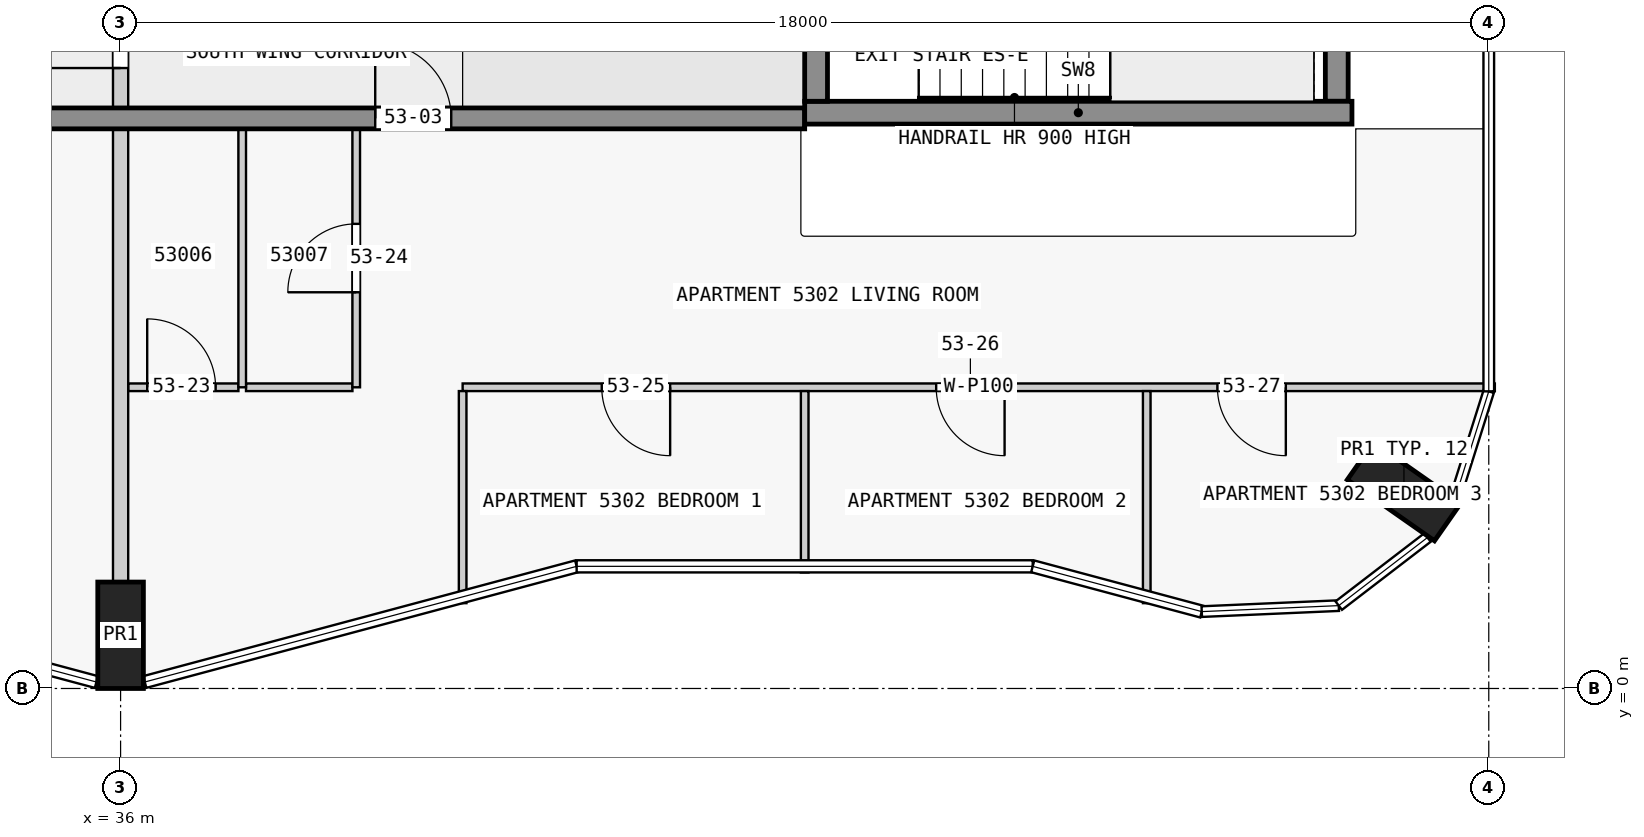
"""IFC4 building model, lengths in metres.
Left out: names, types, materials, properties, quantities, classifications, styles, units other than length and angle.
Written with IfcOpenShell. Run it as: python <this file> out.ifc"""

import sys

from ifc_helpers import new_model, si_unit, direction, frame, frame_2d, origin, origin_2d, place, context, subcontext, project, spatial, rectangle, extrude, element, fill, save


model = new_model("IFC4")
c1 = context("Model", 3, precision=1e-05, world=origin(), true_north=direction((0.0, 1.0)))
c2 = subcontext(c1, "Body", "Model", "MODEL_VIEW")
j1 = project(units=[si_unit("LENGTHUNIT", "METRE"), si_unit("PLANEANGLEUNIT", "RADIAN")], contexts=[c1])
p1 = place(None, origin())
s1 = spatial("IfcSite", under=j1, at=p1, CompositionType="ELEMENT")
p2 = place(p1, origin())
s2 = spatial("IfcBuilding", under=s1, at=p2, CompositionType="ELEMENT")
p3 = place(p2, frame((0.0, 0.0, 204.9)))
s3 = spatial("IfcBuildingStorey", under=s2, at=p3, CompositionType="ELEMENT", Elevation=204.9)
for number, where, z_axis, x_axis in (
    (1, (36.0, 0.7, 0.0), (0.0, 0.0, 1.0), (1.0, 0.0, 0.0)),
    (2, (52.884, 2.59, 0.0), (0.0, 0.0, 1.0), (0.574, 0.819, 0.0)),
):
    element("IfcColumn", number, at=place(p3, frame(where, z_axis=z_axis, x_axis=x_axis)), inside=s3, PredefinedType="COLUMN", context=c2, shape_type="SweptSolid", body=[
        extrude(rectangle(XDim=0.6, YDim=1.4, at=origin_2d()), origin(), (0.0, 0.0, 1.0), 3.5),
    ])
p4 = place(p3, frame((45.15, 7.725, 0.0), z_axis=(0.0, 0.0, 1.0), x_axis=(0.0, 1.0, 0.0)))
e3 = element("IfcWall", 3, at=p4, inside=s3, PredefinedType="SHEAR", context=c2, shape_type="SweptSolid", body=[
    extrude(rectangle(XDim=2.55, YDim=0.3, at=frame_2d((1.275, 0.0))), origin(), (0.0, 0.0, 1.0), 3.5),
])
p5 = place(p4, frame((0.725, 0.0, 0.0)))
e4 = element("IfcOpeningElement", 4, at=p5, cuts=e3, PredefinedType="OPENING", context=c2, shape_type="SweptSolid", body=[
    extrude(rectangle(XDim=1.1, YDim=2.1, at=frame_2d((0.55, 1.05))), frame((0.0, 0.16, 0.0), z_axis=(0.0, -1.0, 0.0), x_axis=(1.0, 0.0, 0.0)), (0.0, 0.0, 1.0), 0.32),
])
p6 = place(p3, frame((52.0, 7.725, 0.0), z_axis=(0.0, 0.0, 1.0), x_axis=(0.0, 1.0, 0.0)))
e5 = element("IfcWall", 5, at=p6, inside=s3, PredefinedType="SHEAR", context=c2, shape_type="SweptSolid", body=[
    extrude(rectangle(XDim=2.55, YDim=0.3, at=frame_2d((1.275, 0.0))), origin(), (0.0, 0.0, 1.0), 3.5),
])
p7 = place(p3, frame((45.0, 7.575, 0.0), z_axis=(0.0, 0.0, 1.0), x_axis=(1.0, 0.0, 0.0)))
e6 = element("IfcWall", 6, at=p7, inside=s3, PredefinedType="SHEAR", context=c2, shape_type="SweptSolid", body=[
    extrude(rectangle(XDim=7.2, YDim=0.3, at=frame_2d((3.6, 0.0))), origin(), (0.0, 0.0, 1.0), 3.5),
])
p8 = place(p3, frame((22.5, 7.5, 0.0), z_axis=(0.0, 0.0, 1.0), x_axis=(1.0, 0.0, 0.0)))
e7 = element("IfcWall", 7, at=p8, inside=s3, PredefinedType="SHEAR", context=c2, shape_type="SweptSolid", body=[
    extrude(rectangle(XDim=22.5, YDim=0.275, at=frame_2d((11.25, 0.0))), origin(), (0.0, 0.0, 1.0), 3.25),
])
p9 = place(p8, frame((4.05, 0.0, 0.0)))
e8 = element("IfcOpeningElement", 8, at=p9, cuts=e7, PredefinedType="OPENING", context=c2, shape_type="SweptSolid", body=[
    extrude(rectangle(XDim=1.0, YDim=2.1, at=frame_2d((0.5, 1.05))), frame((0.0, 0.147, 0.0), z_axis=(0.0, -1.0, 0.0), x_axis=(1.0, 0.0, 0.0)), (0.0, 0.0, 1.0), 0.295),
])
p10 = place(p8, frame((10.35, 0.0, 0.0)))
e9 = element("IfcOpeningElement", 9, at=p10, cuts=e7, PredefinedType="OPENING", context=c2, shape_type="SweptSolid", body=[
    extrude(rectangle(XDim=1.8, YDim=2.1, at=frame_2d((0.9, 1.05))), frame((0.0, 0.147, 0.0), z_axis=(0.0, -1.0, 0.0), x_axis=(1.0, 0.0, 0.0)), (0.0, 0.0, 1.0), 0.295),
])
p11 = place(p8, frame((16.85, 0.0, 0.0)))
e10 = element("IfcOpeningElement", 10, at=p11, cuts=e7, PredefinedType="OPENING", context=c2, shape_type="SweptSolid", body=[
    extrude(rectangle(XDim=1.0, YDim=2.1, at=frame_2d((0.5, 1.05))), frame((0.0, 0.147, 0.0), z_axis=(0.0, -1.0, 0.0), x_axis=(1.0, 0.0, 0.0)), (0.0, 0.0, 1.0), 0.295),
])
p12 = place(p3, frame((54.08, 3.962, 0.0), z_axis=(0.0, 0.0, 1.0), x_axis=(-1.0, 0.0, 0.0)))
e11 = element("IfcWall", 11, at=p12, inside=s3, PredefinedType="PARTITIONING", context=c2, shape_type="SweptSolid", body=[
    extrude(rectangle(XDim=13.58, YDim=0.1, at=frame_2d((6.79, 0.0))), origin(), (0.0, 0.0, 1.0), 3.25),
])
p13 = place(p12, frame((10.85, 0.0, 0.0)))
e12 = element("IfcOpeningElement", 12, at=p13, cuts=e11, PredefinedType="OPENING", context=c2, shape_type="SweptSolid", body=[
    extrude(rectangle(XDim=0.9, YDim=2.1, at=frame_2d((0.45, 1.05))), frame((0.0, 0.06, 0.0), z_axis=(0.0, -1.0, 0.0), x_axis=(1.0, 0.0, 0.0)), (0.0, 0.0, 1.0), 0.12),
])
p14 = place(p12, frame((6.45, 0.0, 0.0)))
e13 = element("IfcOpeningElement", 13, at=p14, cuts=e11, PredefinedType="OPENING", context=c2, shape_type="SweptSolid", body=[
    extrude(rectangle(XDim=0.9, YDim=2.1, at=frame_2d((0.45, 1.05))), frame((0.0, 0.06, 0.0), z_axis=(0.0, -1.0, 0.0), x_axis=(1.0, 0.0, 0.0)), (0.0, 0.0, 1.0), 0.12),
])
p15 = place(p12, frame((2.75, 0.0, 0.0)))
e14 = element("IfcOpeningElement", 14, at=p15, cuts=e11, PredefinedType="OPENING", context=c2, shape_type="SweptSolid", body=[
    extrude(rectangle(XDim=0.9, YDim=2.1, at=frame_2d((0.45, 1.05))), frame((0.0, 0.06, 0.0), z_axis=(0.0, -1.0, 0.0), x_axis=(1.0, 0.0, 0.0)), (0.0, 0.0, 1.0), 0.12),
])
p16 = place(p3, frame((36.1, 3.962, 0.0), z_axis=(0.0, 0.0, 1.0), x_axis=(1.0, 0.0, 0.0)))
e15 = element("IfcWall", 15, at=p16, inside=s3, PredefinedType="PARTITIONING", context=c2, shape_type="SweptSolid", body=[
    extrude(rectangle(XDim=1.45, YDim=0.1, at=frame_2d((0.725, 0.0))), origin(), (0.0, 0.0, 1.0), 3.25),
])
p17 = place(p16, frame((0.25, 0.0, 0.0)))
e16 = element("IfcOpeningElement", 16, at=p17, cuts=e15, PredefinedType="OPENING", context=c2, shape_type="SweptSolid", body=[
    extrude(rectangle(XDim=0.9, YDim=2.1, at=frame_2d((0.45, 1.05))), frame((0.0, 0.06, 0.0), z_axis=(0.0, -1.0, 0.0), x_axis=(1.0, 0.0, 0.0)), (0.0, 0.0, 1.0), 0.12),
])
p18 = place(p3, frame((37.65, 3.962, 0.0), z_axis=(0.0, 0.0, 1.0), x_axis=(1.0, 0.0, 0.0)))
e17 = element("IfcWall", 17, at=p18, inside=s3, PredefinedType="PARTITIONING", context=c2, shape_type="SweptSolid", body=[
    extrude(rectangle(XDim=1.4, YDim=0.1, at=frame_2d((0.7, 0.0))), origin(), (0.0, 0.0, 1.0), 3.25),
])
p19 = place(p3, frame((36.0, 1.4, 0.0), z_axis=(0.0, 0.0, 1.0), x_axis=(0.0, 1.0, 0.0)))
e18 = element("IfcWall", 18, at=p19, inside=s3, PredefinedType="PARTITIONING", context=c2, shape_type="SweptSolid", body=[
    extrude(rectangle(XDim=5.963, YDim=0.2, at=frame_2d((2.981, 0.0))), origin(), (0.0, 0.0, 1.0), 3.25),
])
p20 = place(p3, frame((37.6, 3.962, 0.0), z_axis=(0.0, 0.0, 1.0), x_axis=(0.0, 1.0, 0.0)))
e19 = element("IfcWall", 19, at=p20, inside=s3, PredefinedType="PARTITIONING", context=c2, shape_type="SweptSolid", body=[
    extrude(rectangle(XDim=3.4, YDim=0.1, at=frame_2d((1.7, 0.0))), origin(), (0.0, 0.0, 1.0), 3.25),
])
p21 = place(p3, frame((39.1, 3.962, 0.0), z_axis=(0.0, 0.0, 1.0), x_axis=(0.0, 1.0, 0.0)))
e20 = element("IfcWall", 20, at=p21, inside=s3, PredefinedType="PARTITIONING", context=c2, shape_type="SweptSolid", body=[
    extrude(rectangle(XDim=3.4, YDim=0.1, at=frame_2d((1.7, 0.0))), origin(), (0.0, 0.0, 1.0), 3.25),
])
p22 = place(p21, frame((1.25, 0.0, 0.0)))
e21 = element("IfcOpeningElement", 21, at=p22, cuts=e20, PredefinedType="OPENING", context=c2, shape_type="SweptSolid", body=[
    extrude(rectangle(XDim=0.9, YDim=2.1, at=frame_2d((0.45, 1.05))), frame((0.0, 0.06, 0.0), z_axis=(0.0, -1.0, 0.0), x_axis=(1.0, 0.0, 0.0)), (0.0, 0.0, 1.0), 0.12),
])
p23 = place(p3, frame((40.5, 3.913, 0.0), z_axis=(0.0, 0.0, 1.0), x_axis=(0.0, -1.0, 0.0)))
e22 = element("IfcWall", 22, at=p23, inside=s3, PredefinedType="PARTITIONING", context=c2, shape_type="SweptSolid", body=[
    extrude(rectangle(XDim=2.79, YDim=0.1, at=frame_2d((1.395, 0.0))), origin(), (0.0, 0.0, 1.0), 3.25),
])
p24 = place(p3, frame((45.0, 1.527, 0.0), z_axis=(0.0, 0.0, 1.0), x_axis=(0.0, 1.0, 0.0)))
e23 = element("IfcWall", 23, at=p24, inside=s3, PredefinedType="PARTITIONING", context=c2, shape_type="SweptSolid", body=[
    extrude(rectangle(XDim=2.386, YDim=0.1, at=frame_2d((1.193, 0.0))), origin(), (0.0, 0.0, 1.0), 3.25),
])
p25 = place(p3, frame((49.5, 1.122, 0.0), z_axis=(0.0, 0.0, 1.0), x_axis=(0.0, 1.0, 0.0)))
e24 = element("IfcWall", 24, at=p25, inside=s3, PredefinedType="PARTITIONING", context=c2, shape_type="SweptSolid", body=[
    extrude(rectangle(XDim=2.79, YDim=0.1, at=frame_2d((1.395, 0.0))), origin(), (0.0, 0.0, 1.0), 3.25),
])
p26 = place(p3, frame((36.0, 7.462, 0.0), z_axis=(0.0, 0.0, 1.0), x_axis=(0.0, 1.0, 0.0)))
e25 = element("IfcWall", 25, at=p26, inside=s3, PredefinedType="PARTITIONING", context=c2, shape_type="SweptSolid", body=[
    extrude(rectangle(XDim=3.175, YDim=0.2, at=frame_2d((1.587, 0.0))), origin(), (0.0, 0.0, 1.0), 3.25),
])
p27 = place(p26, frame((0.7, 0.0, 0.0)))
e26 = element("IfcOpeningElement", 26, at=p27, cuts=e25, PredefinedType="OPENING", context=c2, shape_type="SweptSolid", body=[
    extrude(rectangle(XDim=1.8, YDim=2.1, at=frame_2d((0.9, 1.05))), frame((0.0, 0.11, 0.0), z_axis=(0.0, -1.0, 0.0), x_axis=(1.0, 0.0, 0.0)), (0.0, 0.0, 1.0), 0.22),
])
p28 = place(p11, origin())
e27 = element("IfcDoor", 27, at=p28, inside=s3, OperationType="SINGLE_SWING_RIGHT", PredefinedType="DOOR", context=c2, shape_type="SweptSolid", body=[
    extrude(rectangle(XDim=1.0, YDim=2.1, at=frame_2d((0.5, 1.05))), frame((0.0, 0.025, 0.0), z_axis=(0.0, -1.0, 0.0), x_axis=(1.0, 0.0, 0.0)), (0.0, 0.0, 1.0), 0.05),
])
fill(e10, e27)
p29 = place(p27, origin())
e28 = element("IfcDoor", 28, at=p29, inside=s3, OperationType="SINGLE_SWING_RIGHT", PredefinedType="DOOR", context=c2, shape_type="SweptSolid", body=[
    extrude(rectangle(XDim=1.8, YDim=2.1, at=frame_2d((0.9, 1.05))), frame((0.0, 0.025, 0.0), z_axis=(0.0, -1.0, 0.0), x_axis=(1.0, 0.0, 0.0)), (0.0, 0.0, 1.0), 0.05),
])
fill(e26, e28)
p30 = place(p17, origin())
e29 = element("IfcDoor", 29, at=p30, inside=s3, OperationType="SINGLE_SWING_LEFT", PredefinedType="DOOR", context=c2, shape_type="SweptSolid", body=[
    extrude(rectangle(XDim=0.9, YDim=2.1, at=frame_2d((0.45, 1.05))), frame((0.0, 0.025, 0.0), z_axis=(0.0, -1.0, 0.0), x_axis=(1.0, 0.0, 0.0)), (0.0, 0.0, 1.0), 0.05),
])
fill(e16, e29)
p31 = place(p22, origin())
e30 = element("IfcDoor", 30, at=p31, inside=s3, OperationType="SINGLE_SWING_LEFT", PredefinedType="DOOR", context=c2, shape_type="SweptSolid", body=[
    extrude(rectangle(XDim=0.9, YDim=2.1, at=frame_2d((0.45, 1.05))), frame((0.0, 0.025, 0.0), z_axis=(0.0, -1.0, 0.0), x_axis=(1.0, 0.0, 0.0)), (0.0, 0.0, 1.0), 0.05),
])
fill(e21, e30)
p32 = place(p13, origin())
e31 = element("IfcDoor", 31, at=p32, inside=s3, OperationType="SINGLE_SWING_RIGHT", PredefinedType="DOOR", context=c2, shape_type="SweptSolid", body=[
    extrude(rectangle(XDim=0.9, YDim=2.1, at=frame_2d((0.45, 1.05))), frame((0.0, 0.025, 0.0), z_axis=(0.0, -1.0, 0.0), x_axis=(1.0, 0.0, 0.0)), (0.0, 0.0, 1.0), 0.05),
])
fill(e12, e31)
p33 = place(p14, origin())
e32 = element("IfcDoor", 32, at=p33, inside=s3, OperationType="SINGLE_SWING_RIGHT", PredefinedType="DOOR", context=c2, shape_type="SweptSolid", body=[
    extrude(rectangle(XDim=0.9, YDim=2.1, at=frame_2d((0.45, 1.05))), frame((0.0, 0.025, 0.0), z_axis=(0.0, -1.0, 0.0), x_axis=(1.0, 0.0, 0.0)), (0.0, 0.0, 1.0), 0.05),
])
fill(e13, e32)
p34 = place(p15, origin())
e33 = element("IfcDoor", 33, at=p34, inside=s3, OperationType="SINGLE_SWING_LEFT", PredefinedType="DOOR", context=c2, shape_type="SweptSolid", body=[
    extrude(rectangle(XDim=0.9, YDim=2.1, at=frame_2d((0.45, 1.05))), frame((0.0, 0.025, 0.0), z_axis=(0.0, -1.0, 0.0), x_axis=(1.0, 0.0, 0.0)), (0.0, 0.0, 1.0), 0.05),
])
fill(e14, e33)
save(model, sys.argv[1])
